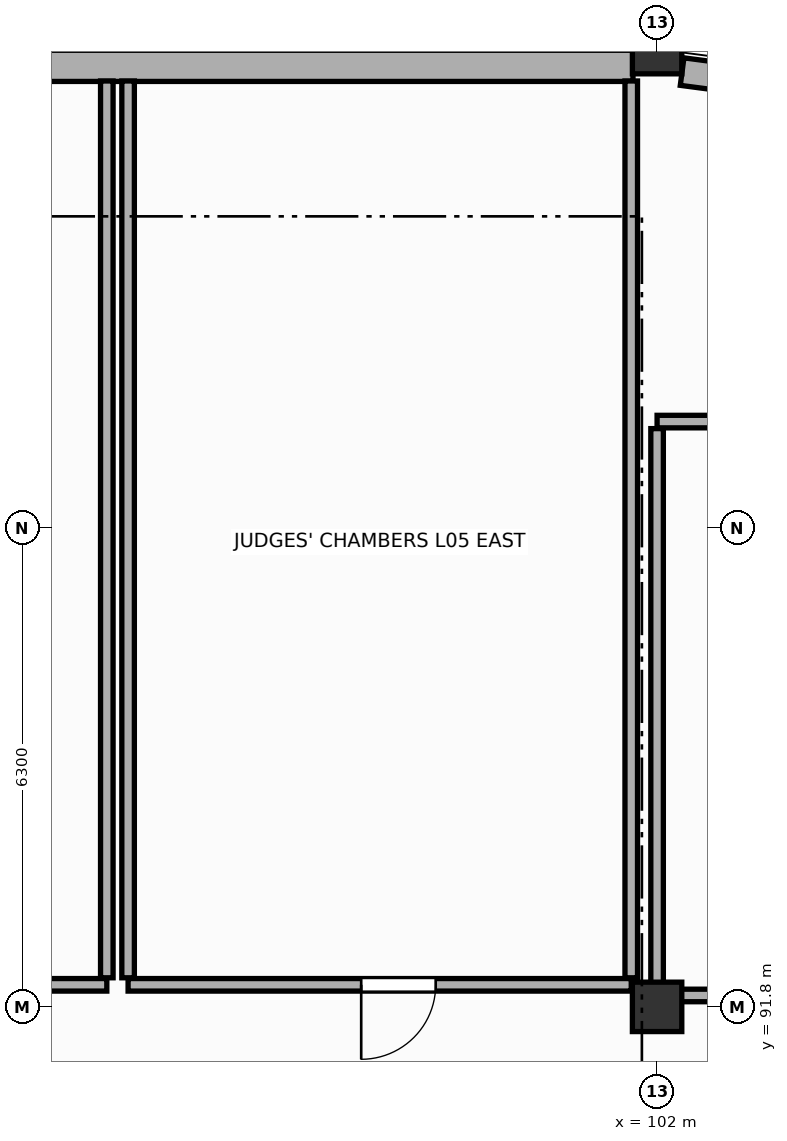
"""IFC4 building model, lengths in metres.
Left out: names, types, materials, properties, quantities, classifications, styles, units other than length and angle.
Written with IfcOpenShell. Run it as: python <this file> out.ifc"""

import sys

from ifc_helpers import new_model, si_unit, direction, frame, frame_2d, origin, origin_2d, place, context, subcontext, project, spatial, rectangle, extrude, element, fill, save


model = new_model("IFC4")
c1 = context("Model", 3, precision=1e-05, world=origin(), true_north=direction((0.0, 1.0)))
c2 = subcontext(c1, "Body", "Model", "MODEL_VIEW")
j1 = project(units=[si_unit("LENGTHUNIT", "METRE"), si_unit("PLANEANGLEUNIT", "RADIAN")], contexts=[c1])
p1 = place(None, origin())
s1 = spatial("IfcSite", under=j1, at=p1, CompositionType="ELEMENT")
p2 = place(p1, origin())
s2 = spatial("IfcBuilding", under=s1, at=p2, CompositionType="ELEMENT")
p3 = place(p2, frame((0.0, 0.0, 18.6)))
s3 = spatial("IfcBuildingStorey", under=s2, at=p3, CompositionType="ELEMENT", Elevation=18.6)
for number, where, z_axis, x_axis in (
    (1, (102.0, 91.8, 0.0), (0.0, 0.0, 1.0), (1.0, 0.0, 0.0)),
    (2, (102.0, 104.4, 0.0), (0.0, 0.0, 1.0), (1.0, 0.0, 0.0)),
):
    element("IfcColumn", number, at=place(p3, frame(where, z_axis=z_axis, x_axis=x_axis)), inside=s3, PredefinedType="COLUMN", context=c2, shape_type="SweptSolid", body=[
        extrude(rectangle(XDim=0.65, YDim=0.65, at=origin_2d()), origin(), (0.0, 0.0, 1.0), 4.2),
    ])
p4 = place(p3, frame((92.717, 104.18, 0.0), z_axis=(0.0, 0.0, 1.0), x_axis=(1.0, 0.0, 0.0)))
e3 = element("IfcWall", 3, at=p4, inside=s3, PredefinedType="STANDARD", context=c2, shape_type="SweptSolid", body=[
    extrude(rectangle(XDim=8.966, YDim=0.41, at=frame_2d((4.483, 0.0))), origin(), (0.0, 0.0, 1.0), 2.49),
])
p5 = place(p3, frame((105.229, 103.723, 0.0), z_axis=(0.0, 0.0, 1.0), x_axis=(-0.99144889538, 0.13049554724, 0.0)))
e4 = element("IfcWall", 4, at=p5, inside=s3, PredefinedType="ELEMENTEDWALL", context=c2, shape_type="SweptSolid", body=[
    extrude(rectangle(XDim=2.924, YDim=0.365, at=frame_2d((1.462, 0.0))), origin(), (0.0, 0.0, 1.0), 3.09),
])
p6 = place(p5, frame((1.062, 0.0, 0.85)))
e5 = element("IfcOpeningElement", 5, at=p6, cuts=e4, PredefinedType="OPENING", context=c2, shape_type="SweptSolid", body=[
    extrude(rectangle(XDim=0.8, YDim=1.7, at=frame_2d((0.4, 0.85))), frame((0.0, 0.192, 0.0), z_axis=(0.0, -1.0, 0.0), x_axis=(1.0, 0.0, 0.0)), (0.0, 0.0, 1.0), 0.385),
])
p7 = place(p3, frame((94.76, 92.09, 0.0), z_axis=(0.0, 0.0, 1.0), x_axis=(-1.0, 0.0, 0.0)))
e6 = element("IfcWall", 6, at=p7, inside=s3, PredefinedType="PARTITIONING", context=c2, shape_type="SweptSolid", body=[
    extrude(rectangle(XDim=6.62, YDim=0.165, at=frame_2d((3.31, 0.0))), origin(), (0.0, 0.0, 1.0), 2.44),
])
p8 = place(p7, frame((4.055, 0.0, 0.0)))
e7 = element("IfcOpeningElement", 7, at=p8, cuts=e6, PredefinedType="OPENING", context=c2, shape_type="SweptSolid", body=[
    extrude(rectangle(XDim=0.98, YDim=2.2, at=frame_2d((0.49, 1.1))), frame((0.0, 0.093, 0.0), z_axis=(0.0, -1.0, 0.0), x_axis=(1.0, 0.0, 0.0)), (0.0, 0.0, 1.0), 0.185),
])
p9 = place(p3, frame((94.76, 103.981, 0.0), z_axis=(0.0, 0.0, 1.0), x_axis=(0.0, -1.0, 0.0)))
e8 = element("IfcWall", 8, at=p9, inside=s3, PredefinedType="PARTITIONING", context=c2, shape_type="SweptSolid", body=[
    extrude(rectangle(XDim=11.798, YDim=0.165, at=frame_2d((5.899, 0.0))), origin(), (0.0, 0.0, 1.0), 3.29),
])
p10 = place(p3, frame((101.66, 92.09, 0.0), z_axis=(0.0, 0.0, 1.0), x_axis=(-1.0, 0.0, 0.0)))
e9 = element("IfcWall", 9, at=p10, inside=s3, PredefinedType="PARTITIONING", context=c2, shape_type="SweptSolid", body=[
    extrude(rectangle(XDim=6.62, YDim=0.165, at=frame_2d((3.31, 0.0))), origin(), (0.0, 0.0, 1.0), 3.09),
])
p11 = place(p10, frame((2.573, 0.0, 0.0)))
e10 = element("IfcOpeningElement", 10, at=p11, cuts=e9, PredefinedType="OPENING", context=c2, shape_type="SweptSolid", body=[
    extrude(rectangle(XDim=0.98, YDim=2.2, at=frame_2d((0.49, 1.1))), frame((0.0, 0.093, 0.0), z_axis=(0.0, -1.0, 0.0), x_axis=(1.0, 0.0, 0.0)), (0.0, 0.0, 1.0), 0.185),
])
p12 = place(p3, frame((95.04, 92.183, 0.0), z_axis=(0.0, 0.0, 1.0), x_axis=(0.0, 1.0, 0.0)))
e11 = element("IfcWall", 11, at=p12, inside=s3, PredefinedType="PARTITIONING", context=c2, shape_type="SweptSolid", body=[
    extrude(rectangle(XDim=11.798, YDim=0.165, at=frame_2d((5.899, 0.0))), origin(), (0.0, 0.0, 1.0), 3.29),
])
p13 = place(p3, frame((101.66, 103.981, 0.0), z_axis=(0.0, 0.0, 1.0), x_axis=(0.0, -1.0, 0.0)))
e12 = element("IfcWall", 12, at=p13, inside=s3, PredefinedType="PARTITIONING", context=c2, shape_type="SweptSolid", body=[
    extrude(rectangle(XDim=11.798, YDim=0.165, at=frame_2d((5.899, 0.0))), origin(), (0.0, 0.0, 1.0), 3.09),
])
p14 = place(p3, frame((102.0, 99.5, 0.0), z_axis=(0.0, 0.0, 1.0), x_axis=(1.0, 0.0, 0.0)))
e13 = element("IfcWall", 13, at=p14, inside=s3, PredefinedType="PARTITIONING", context=c2, shape_type="SweptSolid", body=[
    extrude(rectangle(XDim=9.5, YDim=0.165, at=frame_2d((4.75, 0.0))), origin(), (0.0, 0.0, 1.0), 2.99),
])
p15 = place(p3, frame((111.5, 91.95, 0.0), z_axis=(0.0, 0.0, 1.0), x_axis=(-1.0, 0.0, 0.0)))
e14 = element("IfcWall", 14, at=p15, inside=s3, PredefinedType="PARTITIONING", context=c2, shape_type="SweptSolid", body=[
    extrude(rectangle(XDim=9.5, YDim=0.165, at=frame_2d((4.75, 0.0))), origin(), (0.0, 0.0, 1.0), 2.99),
])
p16 = place(p15, frame((1.13, 0.0, 0.0)))
e15 = element("IfcOpeningElement", 15, at=p16, cuts=e14, PredefinedType="OPENING", context=c2, shape_type="SweptSolid", body=[
    extrude(rectangle(XDim=1.0, YDim=2.15, at=frame_2d((0.5, 1.075))), frame((0.0, 0.093, 0.0), z_axis=(0.0, -1.0, 0.0), x_axis=(1.0, 0.0, 0.0)), (0.0, 0.0, 1.0), 0.185),
])
p17 = place(p3, frame((102.0, 92.042, 0.0), z_axis=(0.0, 0.0, 1.0), x_axis=(0.0, 1.0, 0.0)))
e16 = element("IfcWall", 16, at=p17, inside=s3, PredefinedType="PARTITIONING", context=c2, shape_type="SweptSolid", body=[
    extrude(rectangle(XDim=7.365, YDim=0.165, at=frame_2d((3.683, 0.0))), origin(), (0.0, 0.0, 1.0), 3.09),
])
p18 = place(p11, origin())
e17 = element("IfcDoor", 17, at=p18, inside=s3, OperationType="SINGLE_SWING_RIGHT", PredefinedType="DOOR", context=c2, shape_type="SweptSolid", body=[
    extrude(rectangle(XDim=0.98, YDim=2.2, at=frame_2d((0.49, 1.1))), frame((0.0, 0.025, 0.0), z_axis=(0.0, -1.0, 0.0), x_axis=(1.0, 0.0, 0.0)), (0.0, 0.0, 1.0), 0.05),
])
fill(e10, e17)
save(model, sys.argv[1])
